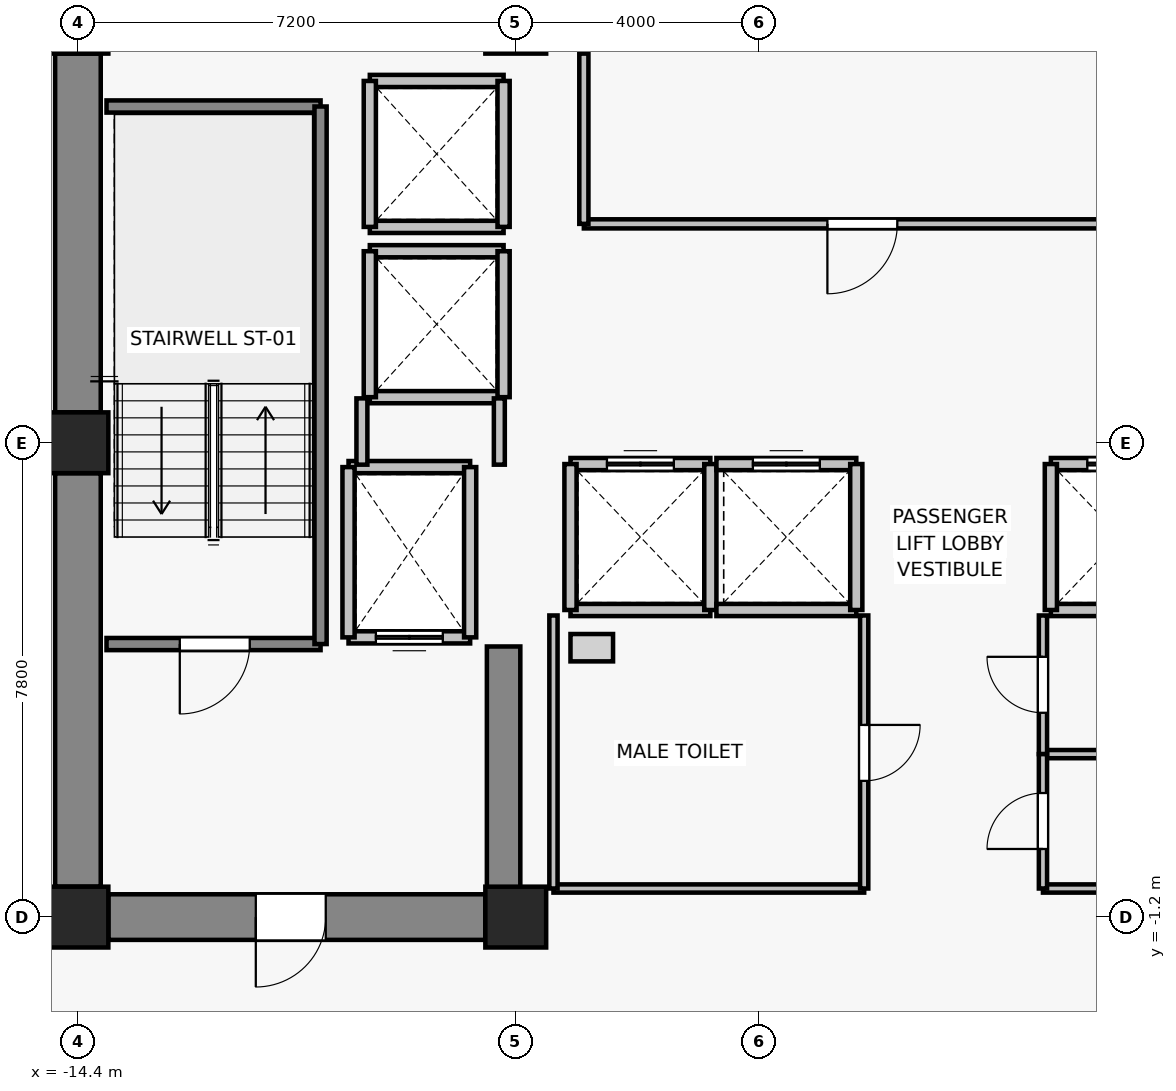
"""IFC4 building model, lengths in metres.
Left out: names, types, materials, properties, quantities, classifications, styles, units other than length and angle.
Written with IfcOpenShell. Run it as: python <this file> out.ifc"""

import sys

from ifc_helpers import new_model, si_unit, direction, frame, frame_2d, origin, origin_2d, place, context, subcontext, project, spatial, rectangle, extrude, source, transform, mapped, element, fill, save


model = new_model("IFC4")
c1 = context("Model", 3, precision=1e-05, world=origin(), true_north=direction((0.0, 1.0)))
c2 = subcontext(c1, "Body", "Model", "MODEL_VIEW")
j1 = project(units=[si_unit("LENGTHUNIT", "METRE"), si_unit("PLANEANGLEUNIT", "RADIAN")], contexts=[c1])
p1 = place(None, origin())
s1 = spatial("IfcSite", under=j1, at=p1, CompositionType="ELEMENT")
p2 = place(p1, origin())
s2 = spatial("IfcBuilding", under=s1, at=p2, CompositionType="ELEMENT")
p3 = place(p2, frame((0.0, 0.0, 166.0)))
s3 = spatial("IfcBuildingStorey", under=s2, at=p3, CompositionType="ELEMENT", Elevation=166.0)
for number, where, z_axis, x_axis in (
    (1, (-14.4, -1.2, 0.0), (0.0, 0.0, 1.0), (1.0, 0.0, 0.0)),
    (2, (-7.2, -1.2, 0.0), (0.0, 0.0, 1.0), (1.0, 0.0, 0.0)),
    (3, (-14.4, 6.6, 0.0), (0.0, 0.0, 1.0), (1.0, 0.0, 0.0)),
    (4, (-14.4, 13.5, 0.0), (0.0, 0.0, 1.0), (1.0, 0.0, 0.0)),
    (5, (-7.2, 13.5, 0.0), (0.0, 0.0, 1.0), (1.0, 0.0, 0.0)),
):
    element("IfcColumn", number, at=place(p3, frame(where, z_axis=z_axis, x_axis=x_axis)), inside=s3, PredefinedType="COLUMN", context=c2, shape_type="SweptSolid", body=[
        extrude(rectangle(XDim=1.0, YDim=1.0, at=origin_2d()), origin(), (0.0, 0.0, 1.0), 3.3),
    ])
p4 = place(p3, frame((-14.4, -0.7, 0.0), z_axis=(0.0, 0.0, 1.0), x_axis=(0.0, 1.0, 0.0)))
e6 = element("IfcWall", 6, at=p4, inside=s3, PredefinedType="SHEAR", context=c2, shape_type="SweptSolid", body=[
    extrude(rectangle(XDim=6.8, YDim=0.75, at=frame_2d((3.4, 0.0))), origin(), (0.0, 0.0, 1.0), 3.075),
])
p5 = place(p3, frame((-14.4, 7.1, 0.0), z_axis=(0.0, 0.0, 1.0), x_axis=(0.0, 1.0, 0.0)))
e7 = element("IfcWall", 7, at=p5, inside=s3, PredefinedType="SHEAR", context=c2, shape_type="SweptSolid", body=[
    extrude(rectangle(XDim=5.9, YDim=0.75, at=frame_2d((2.95, 0.0))), origin(), (0.0, 0.0, 1.0), 3.075),
])
p6 = place(p3, frame((-7.7, -1.2, 0.0), z_axis=(0.0, 0.0, 1.0), x_axis=(-1.0, 0.0, 0.0)))
e8 = element("IfcWall", 8, at=p6, inside=s3, PredefinedType="SHEAR", context=c2, shape_type="SweptSolid", body=[
    extrude(rectangle(XDim=6.2, YDim=0.75, at=frame_2d((3.1, 0.0))), origin(), (0.0, 0.0, 1.0), 3.075),
])
p7 = place(p6, frame((2.625, 0.0, 0.0)))
e9 = element("IfcOpeningElement", 9, at=p7, cuts=e8, PredefinedType="OPENING", context=c2, shape_type="SweptSolid", body=[
    extrude(rectangle(XDim=1.15, YDim=2.15, at=frame_2d((0.575, 1.075))), frame((0.0, 0.385, 0.0), z_axis=(0.0, -1.0, 0.0), x_axis=(1.0, 0.0, 0.0)), (0.0, 0.0, 1.0), 0.77),
])
p8 = place(p3, frame((-7.4, -0.825, 0.0), z_axis=(0.0, 0.0, 1.0), x_axis=(0.0, 1.0, 0.0)))
e10 = element("IfcWall", 10, at=p8, inside=s3, PredefinedType="SHEAR", context=c2, shape_type="SweptSolid", body=[
    extrude(rectangle(XDim=4.075, YDim=0.55, at=frame_2d((2.038, 0.0))), origin(), (0.0, 0.0, 1.0), 3.075),
])
p9 = place(p3, frame((-7.95, 3.4, 0.0), z_axis=(0.0, 0.0, 1.0), x_axis=(-1.0, 0.0, 0.0)))
e11 = element("IfcWall", 11, at=p9, inside=s3, PredefinedType="SOLIDWALL", context=c2, shape_type="SweptSolid", body=[
    extrude(rectangle(XDim=2.0, YDim=0.2, at=frame_2d((1.0, 0.0))), origin(), (0.0, 0.0, 1.0), 3.075),
])
p10 = place(p9, frame((0.45, 0.0, 0.0)))
e12 = element("IfcOpeningElement", 12, at=p10, cuts=e11, PredefinedType="OPENING", context=c2, shape_type="SweptSolid", body=[
    extrude(rectangle(XDim=1.1, YDim=2.2, at=frame_2d((0.55, 1.1))), frame((0.0, 0.11, 0.0), z_axis=(0.0, -1.0, 0.0), x_axis=(1.0, 0.0, 0.0)), (0.0, 0.0, 1.0), 0.22),
])
p11 = place(p3, frame((-9.95, 6.2, 0.0), z_axis=(0.0, 0.0, 1.0), x_axis=(1.0, 0.0, 0.0)))
e13 = element("IfcWall", 13, at=p11, inside=s3, PredefinedType="SOLIDWALL", context=c2, shape_type="SweptSolid", body=[
    extrude(rectangle(XDim=2.0, YDim=0.2, at=frame_2d((1.0, 0.0))), origin(), (0.0, 0.0, 1.0), 3.075),
])
for number, where, z_axis, x_axis in (
    (14, (-9.95, 3.4, 0.0), (0.0, 0.0, 1.0), (0.0, 1.0, 0.0)),
    (15, (-7.95, 6.2, 0.0), (0.0, 0.0, 1.0), (0.0, -1.0, 0.0)),
):
    element("IfcWall", number, at=place(p3, frame(where, z_axis=z_axis, x_axis=x_axis)), inside=s3, PredefinedType="SOLIDWALL", context=c2, shape_type="SweptSolid", body=[
        extrude(rectangle(XDim=2.8, YDim=0.2, at=frame_2d((1.4, 0.0))), origin(), (0.0, 0.0, 1.0), 3.075),
    ])
p12 = place(p3, frame((-4.0, 3.85, 0.0), z_axis=(0.0, 0.0, 1.0), x_axis=(-1.0, 0.0, 0.0)))
e16 = element("IfcWall", 16, at=p12, inside=s3, PredefinedType="SOLIDWALL", context=c2, shape_type="SweptSolid", body=[
    extrude(rectangle(XDim=2.3, YDim=0.2, at=frame_2d((1.15, 0.0))), origin(), (0.0, 0.0, 1.0), 3.075),
])
p13 = place(p3, frame((-6.3, 6.25, 0.0), z_axis=(0.0, 0.0, 1.0), x_axis=(1.0, 0.0, 0.0)))
e17 = element("IfcWall", 17, at=p13, inside=s3, PredefinedType="SOLIDWALL", context=c2, shape_type="SweptSolid", body=[
    extrude(rectangle(XDim=2.3, YDim=0.2, at=frame_2d((1.15, 0.0))), origin(), (0.0, 0.0, 1.0), 3.075),
])
p14 = place(p13, frame((0.6, 0.0, 0.0)))
e18 = element("IfcOpeningElement", 18, at=p14, cuts=e17, PredefinedType="OPENING", context=c2, shape_type="SweptSolid", body=[
    extrude(rectangle(XDim=1.1, YDim=2.2, at=frame_2d((0.55, 1.1))), frame((0.0, 0.11, 0.0), z_axis=(0.0, -1.0, 0.0), x_axis=(1.0, 0.0, 0.0)), (0.0, 0.0, 1.0), 0.22),
])
for number, where, z_axis, x_axis in (
    (19, (-6.3, 3.85, 0.0), (0.0, 0.0, 1.0), (0.0, 1.0, 0.0)),
    (20, (-4.0, 6.25, 0.0), (0.0, 0.0, 1.0), (0.0, -1.0, 0.0)),
):
    element("IfcWall", number, at=place(p3, frame(where, z_axis=z_axis, x_axis=x_axis)), inside=s3, PredefinedType="SOLIDWALL", context=c2, shape_type="SweptSolid", body=[
        extrude(rectangle(XDim=2.4, YDim=0.2, at=frame_2d((1.2, 0.0))), origin(), (0.0, 0.0, 1.0), 3.075),
    ])
p15 = place(p3, frame((-1.6, 3.85, 0.0), z_axis=(0.0, 0.0, 1.0), x_axis=(-1.0, 0.0, 0.0)))
e21 = element("IfcWall", 21, at=p15, inside=s3, PredefinedType="SOLIDWALL", context=c2, shape_type="SweptSolid", body=[
    extrude(rectangle(XDim=2.3, YDim=0.2, at=frame_2d((1.15, 0.0))), origin(), (0.0, 0.0, 1.0), 3.075),
])
p16 = place(p3, frame((-3.9, 6.25, 0.0), z_axis=(0.0, 0.0, 1.0), x_axis=(1.0, 0.0, 0.0)))
e22 = element("IfcWall", 22, at=p16, inside=s3, PredefinedType="SOLIDWALL", context=c2, shape_type="SweptSolid", body=[
    extrude(rectangle(XDim=2.3, YDim=0.2, at=frame_2d((1.15, 0.0))), origin(), (0.0, 0.0, 1.0), 3.075),
])
p17 = place(p16, frame((0.6, 0.0, 0.0)))
e23 = element("IfcOpeningElement", 23, at=p17, cuts=e22, PredefinedType="OPENING", context=c2, shape_type="SweptSolid", body=[
    extrude(rectangle(XDim=1.1, YDim=2.2, at=frame_2d((0.55, 1.1))), frame((0.0, 0.11, 0.0), z_axis=(0.0, -1.0, 0.0), x_axis=(1.0, 0.0, 0.0)), (0.0, 0.0, 1.0), 0.22),
])
p18 = place(p3, frame((-1.6, 6.25, 0.0), z_axis=(0.0, 0.0, 1.0), x_axis=(0.0, -1.0, 0.0)))
e24 = element("IfcWall", 24, at=p18, inside=s3, PredefinedType="SOLIDWALL", context=c2, shape_type="SweptSolid", body=[
    extrude(rectangle(XDim=2.4, YDim=0.2, at=frame_2d((1.2, 0.0))), origin(), (0.0, 0.0, 1.0), 3.075),
])
p19 = place(p3, frame((3.9, 3.85, 0.0), z_axis=(0.0, 0.0, 1.0), x_axis=(-1.0, 0.0, 0.0)))
e25 = element("IfcWall", 25, at=p19, inside=s3, PredefinedType="SOLIDWALL", context=c2, shape_type="SweptSolid", body=[
    extrude(rectangle(XDim=2.3, YDim=0.2, at=frame_2d((1.15, 0.0))), origin(), (0.0, 0.0, 1.0), 3.075),
])
p20 = place(p3, frame((1.6, 6.25, 0.0), z_axis=(0.0, 0.0, 1.0), x_axis=(1.0, 0.0, 0.0)))
e26 = element("IfcWall", 26, at=p20, inside=s3, PredefinedType="SOLIDWALL", context=c2, shape_type="SweptSolid", body=[
    extrude(rectangle(XDim=2.3, YDim=0.2, at=frame_2d((1.15, 0.0))), origin(), (0.0, 0.0, 1.0), 3.075),
])
p21 = place(p20, frame((0.6, 0.0, 0.0)))
e27 = element("IfcOpeningElement", 27, at=p21, cuts=e26, PredefinedType="OPENING", context=c2, shape_type="SweptSolid", body=[
    extrude(rectangle(XDim=1.1, YDim=2.2, at=frame_2d((0.55, 1.1))), frame((0.0, 0.11, 0.0), z_axis=(0.0, -1.0, 0.0), x_axis=(1.0, 0.0, 0.0)), (0.0, 0.0, 1.0), 0.22),
])
p22 = place(p3, frame((1.6, 3.85, 0.0), z_axis=(0.0, 0.0, 1.0), x_axis=(0.0, 1.0, 0.0)))
e28 = element("IfcWall", 28, at=p22, inside=s3, PredefinedType="SOLIDWALL", context=c2, shape_type="SweptSolid", body=[
    extrude(rectangle(XDim=2.4, YDim=0.2, at=frame_2d((1.2, 0.0))), origin(), (0.0, 0.0, 1.0), 3.075),
])
for number, where, z_axis, x_axis in (
    (29, (-7.4, 7.35, 0.0), (0.0, 0.0, 1.0), (-1.0, 0.0, 0.0)),
    (30, (-9.6, 9.75, 0.0), (0.0, 0.0, 1.0), (1.0, 0.0, 0.0)),
):
    element("IfcWall", number, at=place(p3, frame(where, z_axis=z_axis, x_axis=x_axis)), inside=s3, PredefinedType="SOLIDWALL", context=c2, shape_type="SweptSolid", body=[
        extrude(rectangle(XDim=2.2, YDim=0.2, at=frame_2d((1.1, 0.0))), origin(), (0.0, 0.0, 1.0), 2.565),
    ])
p23 = place(p3, frame((-9.6, 7.35, 0.0), z_axis=(0.0, 0.0, 1.0), x_axis=(0.0, 1.0, 0.0)))
e31 = element("IfcWall", 31, at=p23, inside=s3, PredefinedType="SOLIDWALL", context=c2, shape_type="SweptSolid", body=[
    extrude(rectangle(XDim=2.4, YDim=0.2, at=frame_2d((1.2, 0.0))), origin(), (0.0, 0.0, 1.0), 3.075),
])
p24 = place(p3, frame((-7.4, 9.75, 0.0), z_axis=(0.0, 0.0, 1.0), x_axis=(0.0, -1.0, 0.0)))
e32 = element("IfcWall", 32, at=p24, inside=s3, PredefinedType="SOLIDWALL", context=c2, shape_type="SweptSolid", body=[
    extrude(rectangle(XDim=2.4, YDim=0.2, at=frame_2d((1.2, 0.0))), origin(), (0.0, 0.0, 1.0), 2.565),
])
for number, where, z_axis, x_axis in (
    (33, (-7.4, 10.15, 0.0), (0.0, 0.0, 1.0), (-1.0, 0.0, 0.0)),
    (34, (-9.6, 12.55, 0.0), (0.0, 0.0, 1.0), (1.0, 0.0, 0.0)),
):
    element("IfcWall", number, at=place(p3, frame(where, z_axis=z_axis, x_axis=x_axis)), inside=s3, PredefinedType="SOLIDWALL", context=c2, shape_type="SweptSolid", body=[
        extrude(rectangle(XDim=2.2, YDim=0.2, at=frame_2d((1.1, 0.0))), origin(), (0.0, 0.0, 1.0), 2.565),
    ])
p25 = place(p3, frame((-9.6, 10.15, 0.0), z_axis=(0.0, 0.0, 1.0), x_axis=(0.0, 1.0, 0.0)))
e35 = element("IfcWall", 35, at=p25, inside=s3, PredefinedType="SOLIDWALL", context=c2, shape_type="SweptSolid", body=[
    extrude(rectangle(XDim=2.4, YDim=0.2, at=frame_2d((1.2, 0.0))), origin(), (0.0, 0.0, 1.0), 3.075),
])
p26 = place(p3, frame((-7.4, 12.55, 0.0), z_axis=(0.0, 0.0, 1.0), x_axis=(0.0, -1.0, 0.0)))
e36 = element("IfcWall", 36, at=p26, inside=s3, PredefinedType="SOLIDWALL", context=c2, shape_type="SweptSolid", body=[
    extrude(rectangle(XDim=2.4, YDim=0.2, at=frame_2d((1.2, 0.0))), origin(), (0.0, 0.0, 1.0), 2.565),
])
p27 = place(p3, frame((-10.41, 3.29, 0.0), z_axis=(0.0, 0.0, 1.0), x_axis=(-1.0, 0.0, 0.0)))
e37 = element("IfcWall", 37, at=p27, inside=s3, PredefinedType="SOLIDWALL", context=c2, shape_type="SweptSolid", body=[
    extrude(rectangle(XDim=3.52, YDim=0.2, at=frame_2d((1.76, 0.0))), origin(), (0.0, 0.0, 1.0), 3.075),
])
p28 = place(p27, frame((1.165, 0.0, 0.0)))
e38 = element("IfcOpeningElement", 38, at=p28, cuts=e37, PredefinedType="OPENING", context=c2, shape_type="SweptSolid", body=[
    extrude(rectangle(XDim=1.15, YDim=2.15, at=frame_2d((0.575, 1.075))), frame((0.0, 0.11, 0.0), z_axis=(0.0, -1.0, 0.0), x_axis=(1.0, 0.0, 0.0)), (0.0, 0.0, 1.0), 0.22),
])
p29 = place(p3, frame((-13.93, 12.13, 0.0), z_axis=(0.0, 0.0, 1.0), x_axis=(1.0, 0.0, 0.0)))
e39 = element("IfcWall", 39, at=p29, inside=s3, PredefinedType="SOLIDWALL", context=c2, shape_type="SweptSolid", body=[
    extrude(rectangle(XDim=3.52, YDim=0.2, at=frame_2d((1.76, 0.0))), origin(), (0.0, 0.0, 1.0), 3.075),
])
p30 = place(p3, frame((-10.41, 12.13, 0.0), z_axis=(0.0, 0.0, 1.0), x_axis=(0.0, -1.0, 0.0)))
e40 = element("IfcWall", 40, at=p30, inside=s3, PredefinedType="SOLIDWALL", context=c2, shape_type="SweptSolid", body=[
    extrude(rectangle(XDim=8.84, YDim=0.2, at=frame_2d((4.42, 0.0))), origin(), (0.0, 0.0, 1.0), 3.075),
])
p31 = place(p3, frame((-9.73, 6.24, 0.0), z_axis=(0.0, 0.0, 1.0), x_axis=(0.0, 1.0, 0.0)))
e41 = element("IfcWall", 41, at=p31, inside=s3, PredefinedType="PARTITIONING", context=c2, shape_type="SweptSolid", body=[
    extrude(rectangle(XDim=1.09, YDim=0.18, at=frame_2d((0.545, 0.0))), origin(), (0.0, 0.0, 1.0), 3.075),
])
p32 = place(p3, frame((-7.47, 7.33, 0.0), z_axis=(0.0, 0.0, 1.0), x_axis=(0.0, -1.0, 0.0)))
e42 = element("IfcWall", 42, at=p32, inside=s3, PredefinedType="PARTITIONING", context=c2, shape_type="SweptSolid", body=[
    extrude(rectangle(XDim=1.09, YDim=0.18, at=frame_2d((0.545, 0.0))), origin(), (0.0, 0.0, 1.0), 2.565),
])
p33 = place(p3, frame((6.08, 10.2, 0.0), z_axis=(0.0, 0.0, 1.0), x_axis=(-1.0, 0.0, 0.0)))
e43 = element("IfcWall", 43, at=p33, inside=s3, PredefinedType="PARTITIONING", context=c2, shape_type="SweptSolid", body=[
    extrude(rectangle(XDim=12.16, YDim=0.15, at=frame_2d((6.08, 0.0))), origin(), (0.0, 0.0, 1.0), 3.075),
])
p34 = place(p33, frame((7.005, 0.0, 0.0)))
e44 = element("IfcOpeningElement", 44, at=p34, cuts=e43, PredefinedType="OPENING", context=c2, shape_type="SweptSolid", body=[
    extrude(rectangle(XDim=1.15, YDim=2.15, at=frame_2d((0.575, 1.075))), frame((0.0, 0.085, 0.0), z_axis=(0.0, -1.0, 0.0), x_axis=(1.0, 0.0, 0.0)), (0.0, 0.0, 1.0), 0.17),
])
p35 = place(p3, frame((-6.08, 10.2, 0.0), z_axis=(0.0, 0.0, 1.0), x_axis=(0.0, 1.0, 0.0)))
e45 = element("IfcWall", 45, at=p35, inside=s3, PredefinedType="PARTITIONING", context=c2, shape_type="SweptSolid", body=[
    extrude(rectangle(XDim=2.8, YDim=0.15, at=frame_2d((1.4, 0.0))), origin(), (0.0, 0.0, 1.0), 3.075),
])
p36 = place(p3, frame((-1.47, -0.73, 0.0), z_axis=(0.0, 0.0, 1.0), x_axis=(-1.0, 0.0, 0.0)))
e46 = element("IfcWall", 46, at=p36, inside=s3, PredefinedType="PARTITIONING", context=c2, shape_type="SweptSolid", body=[
    extrude(rectangle(XDim=5.11, YDim=0.135, at=frame_2d((2.555, 0.0))), origin(), (0.0, 0.0, 1.0), 3.075),
])
p37 = place(p3, frame((-6.58, -0.73, 0.0), z_axis=(0.0, 0.0, 1.0), x_axis=(0.0, 1.0, 0.0)))
e47 = element("IfcWall", 47, at=p37, inside=s3, PredefinedType="PARTITIONING", context=c2, shape_type="SweptSolid", body=[
    extrude(rectangle(XDim=4.49, YDim=0.135, at=frame_2d((2.245, 0.0))), origin(), (0.0, 0.0, 1.0), 3.075),
])
p38 = place(p3, frame((-1.47, 3.76, 0.0), z_axis=(0.0, 0.0, 1.0), x_axis=(0.0, -1.0, 0.0)))
e48 = element("IfcWall", 48, at=p38, inside=s3, PredefinedType="PARTITIONING", context=c2, shape_type="SweptSolid", body=[
    extrude(rectangle(XDim=4.49, YDim=0.135, at=frame_2d((2.245, 0.0))), origin(), (0.0, 0.0, 1.0), 3.075),
])
p39 = place(p38, frame((1.8, 0.0, 0.0)))
e49 = element("IfcOpeningElement", 49, at=p39, cuts=e48, PredefinedType="OPENING", context=c2, shape_type="SweptSolid", body=[
    extrude(rectangle(XDim=0.92, YDim=2.1, at=frame_2d((0.46, 1.05))), frame((0.0, 0.077, 0.0), z_axis=(0.0, -1.0, 0.0), x_axis=(1.0, 0.0, 0.0)), (0.0, 0.0, 1.0), 0.155),
])
p40 = place(p3, frame((6.58, 1.48, 0.0), z_axis=(0.0, 0.0, 1.0), x_axis=(-1.0, 0.0, 0.0)))
e50 = element("IfcWall", 50, at=p40, inside=s3, PredefinedType="PARTITIONING", context=c2, shape_type="SweptSolid", body=[
    extrude(rectangle(XDim=5.11, YDim=0.135, at=frame_2d((2.555, 0.0))), origin(), (0.0, 0.0, 1.0), 3.075),
])
p41 = place(p3, frame((1.47, 1.48, 0.0), z_axis=(0.0, 0.0, 1.0), x_axis=(0.0, 1.0, 0.0)))
e51 = element("IfcWall", 51, at=p41, inside=s3, PredefinedType="PARTITIONING", context=c2, shape_type="SweptSolid", body=[
    extrude(rectangle(XDim=2.28, YDim=0.135, at=frame_2d((1.14, 0.0))), origin(), (0.0, 0.0, 1.0), 3.075),
])
p42 = place(p41, frame((0.68, 0.0, 0.0)))
e52 = element("IfcOpeningElement", 52, at=p42, cuts=e51, PredefinedType="OPENING", context=c2, shape_type="SweptSolid", body=[
    extrude(rectangle(XDim=0.92, YDim=2.1, at=frame_2d((0.46, 1.05))), frame((0.0, 0.077, 0.0), z_axis=(0.0, -1.0, 0.0), x_axis=(1.0, 0.0, 0.0)), (0.0, 0.0, 1.0), 0.155),
])
p43 = place(p3, frame((4.18, -0.73, 0.0), z_axis=(0.0, 0.0, 1.0), x_axis=(-1.0, 0.0, 0.0)))
e53 = element("IfcWall", 53, at=p43, inside=s3, PredefinedType="PARTITIONING", context=c2, shape_type="SweptSolid", body=[
    extrude(rectangle(XDim=2.71, YDim=0.135, at=frame_2d((1.355, 0.0))), origin(), (0.0, 0.0, 1.0), 3.075),
])
p44 = place(p3, frame((1.47, -0.73, 0.0), z_axis=(0.0, 0.0, 1.0), x_axis=(0.0, 1.0, 0.0)))
e54 = element("IfcWall", 54, at=p44, inside=s3, PredefinedType="PARTITIONING", context=c2, shape_type="SweptSolid", body=[
    extrude(rectangle(XDim=2.21, YDim=0.135, at=frame_2d((1.105, 0.0))), origin(), (0.0, 0.0, 1.0), 3.075),
])
p45 = place(p44, frame((0.65, 0.0, 0.0)))
e55 = element("IfcOpeningElement", 55, at=p45, cuts=e54, PredefinedType="OPENING", context=c2, shape_type="SweptSolid", body=[
    extrude(rectangle(XDim=0.92, YDim=2.1, at=frame_2d((0.46, 1.05))), frame((0.0, 0.077, 0.0), z_axis=(0.0, -1.0, 0.0), x_axis=(1.0, 0.0, 0.0)), (0.0, 0.0, 1.0), 0.155),
])
m1 = source(origin(), c2, "Body", "SweptSolid", [
    extrude(rectangle(XDim=1.1, YDim=2.2, at=frame_2d((0.55, 1.1))), frame((0.0, 0.025, 0.0), z_axis=(0.0, -1.0, 0.0), x_axis=(1.0, 0.0, 0.0)), (0.0, 0.0, 1.0), 0.05),
])
p46 = place(p10, origin())
e56 = element("IfcDoor", 56, at=p46, inside=s3, OperationType="DOUBLE_DOOR_SLIDING", PredefinedType="DOOR", context=c2, shape_type="MappedRepresentation", body=[
    mapped(m1, transform((0.0, 0.0, 0.0), x_axis=(1.0, 0.0, 0.0), y_axis=(0.0, 1.0, 0.0), z_axis=(0.0, 0.0, 1.0), scale=1.0)),
])
fill(e12, e56)
p47 = place(p14, origin())
e57 = element("IfcDoor", 57, at=p47, inside=s3, OperationType="DOUBLE_DOOR_SLIDING", PredefinedType="DOOR", context=c2, shape_type="MappedRepresentation", body=[
    mapped(m1, transform((0.0, 0.0, 0.0), x_axis=(1.0, 0.0, 0.0), y_axis=(0.0, 1.0, 0.0), z_axis=(0.0, 0.0, 1.0), scale=1.0)),
])
fill(e18, e57)
p48 = place(p17, origin())
e58 = element("IfcDoor", 58, at=p48, inside=s3, OperationType="DOUBLE_DOOR_SLIDING", PredefinedType="DOOR", context=c2, shape_type="MappedRepresentation", body=[
    mapped(m1, transform((0.0, 0.0, 0.0), x_axis=(1.0, 0.0, 0.0), y_axis=(0.0, 1.0, 0.0), z_axis=(0.0, 0.0, 1.0), scale=1.0)),
])
fill(e23, e58)
p49 = place(p21, origin())
e59 = element("IfcDoor", 59, at=p49, inside=s3, OperationType="DOUBLE_DOOR_SLIDING", PredefinedType="DOOR", context=c2, shape_type="MappedRepresentation", body=[
    mapped(m1, transform((0.0, 0.0, 0.0), x_axis=(1.0, 0.0, 0.0), y_axis=(0.0, 1.0, 0.0), z_axis=(0.0, 0.0, 1.0), scale=1.0)),
])
fill(e27, e59)
m2 = source(origin(), c2, "Body", "SweptSolid", [
    extrude(rectangle(XDim=1.15, YDim=2.15, at=frame_2d((0.575, 1.075))), frame((0.0, 0.025, 0.0), z_axis=(0.0, -1.0, 0.0), x_axis=(1.0, 0.0, 0.0)), (0.0, 0.0, 1.0), 0.05),
])
p50 = place(p28, origin())
e60 = element("IfcDoor", 60, at=p50, inside=s3, OperationType="SINGLE_SWING_RIGHT", PredefinedType="DOOR", context=c2, shape_type="MappedRepresentation", body=[
    mapped(m2, transform((0.0, 0.0, 0.0), x_axis=(1.0, 0.0, 0.0), y_axis=(0.0, 1.0, 0.0), z_axis=(0.0, 0.0, 1.0), scale=1.0)),
])
fill(e38, e60)
p51 = place(p7, origin())
e61 = element("IfcDoor", 61, at=p51, inside=s3, OperationType="SINGLE_SWING_RIGHT", PredefinedType="DOOR", context=c2, shape_type="MappedRepresentation", body=[
    mapped(m2, transform((0.0, 0.0, 0.0), x_axis=(1.0, 0.0, 0.0), y_axis=(0.0, 1.0, 0.0), z_axis=(0.0, 0.0, 1.0), scale=1.0)),
])
fill(e9, e61)
p52 = place(p34, origin())
e62 = element("IfcDoor", 62, at=p52, inside=s3, OperationType="SINGLE_SWING_RIGHT", PredefinedType="DOOR", context=c2, shape_type="MappedRepresentation", body=[
    mapped(m2, transform((0.0, 0.0, 0.0), x_axis=(1.0, 0.0, 0.0), y_axis=(0.0, 1.0, 0.0), z_axis=(0.0, 0.0, 1.0), scale=1.0)),
])
fill(e44, e62)
m3 = source(origin(), c2, "Body", "SweptSolid", [
    extrude(rectangle(XDim=0.92, YDim=2.1, at=frame_2d((0.46, 1.05))), frame((0.0, 0.025, 0.0), z_axis=(0.0, -1.0, 0.0), x_axis=(1.0, 0.0, 0.0)), (0.0, 0.0, 1.0), 0.05),
])
p53 = place(p39, origin())
e63 = element("IfcDoor", 63, at=p53, inside=s3, OperationType="SINGLE_SWING_LEFT", PredefinedType="DOOR", context=c2, shape_type="MappedRepresentation", body=[
    mapped(m3, transform((0.0, 0.0, 0.0), x_axis=(1.0, 0.0, 0.0), y_axis=(0.0, 1.0, 0.0), z_axis=(0.0, 0.0, 1.0), scale=1.0)),
])
fill(e49, e63)
p54 = place(p42, origin())
e64 = element("IfcDoor", 64, at=p54, inside=s3, OperationType="SINGLE_SWING_RIGHT", PredefinedType="DOOR", context=c2, shape_type="MappedRepresentation", body=[
    mapped(m3, transform((0.0, 0.0, 0.0), x_axis=(1.0, 0.0, 0.0), y_axis=(0.0, 1.0, 0.0), z_axis=(0.0, 0.0, 1.0), scale=1.0)),
])
fill(e52, e64)
p55 = place(p45, origin())
e65 = element("IfcDoor", 65, at=p55, inside=s3, OperationType="SINGLE_SWING_LEFT", PredefinedType="DOOR", context=c2, shape_type="MappedRepresentation", body=[
    mapped(m3, transform((0.0, 0.0, 0.0), x_axis=(1.0, 0.0, 0.0), y_axis=(0.0, 1.0, 0.0), z_axis=(0.0, 0.0, 1.0), scale=1.0)),
])
fill(e55, e65)
save(model, sys.argv[1])
